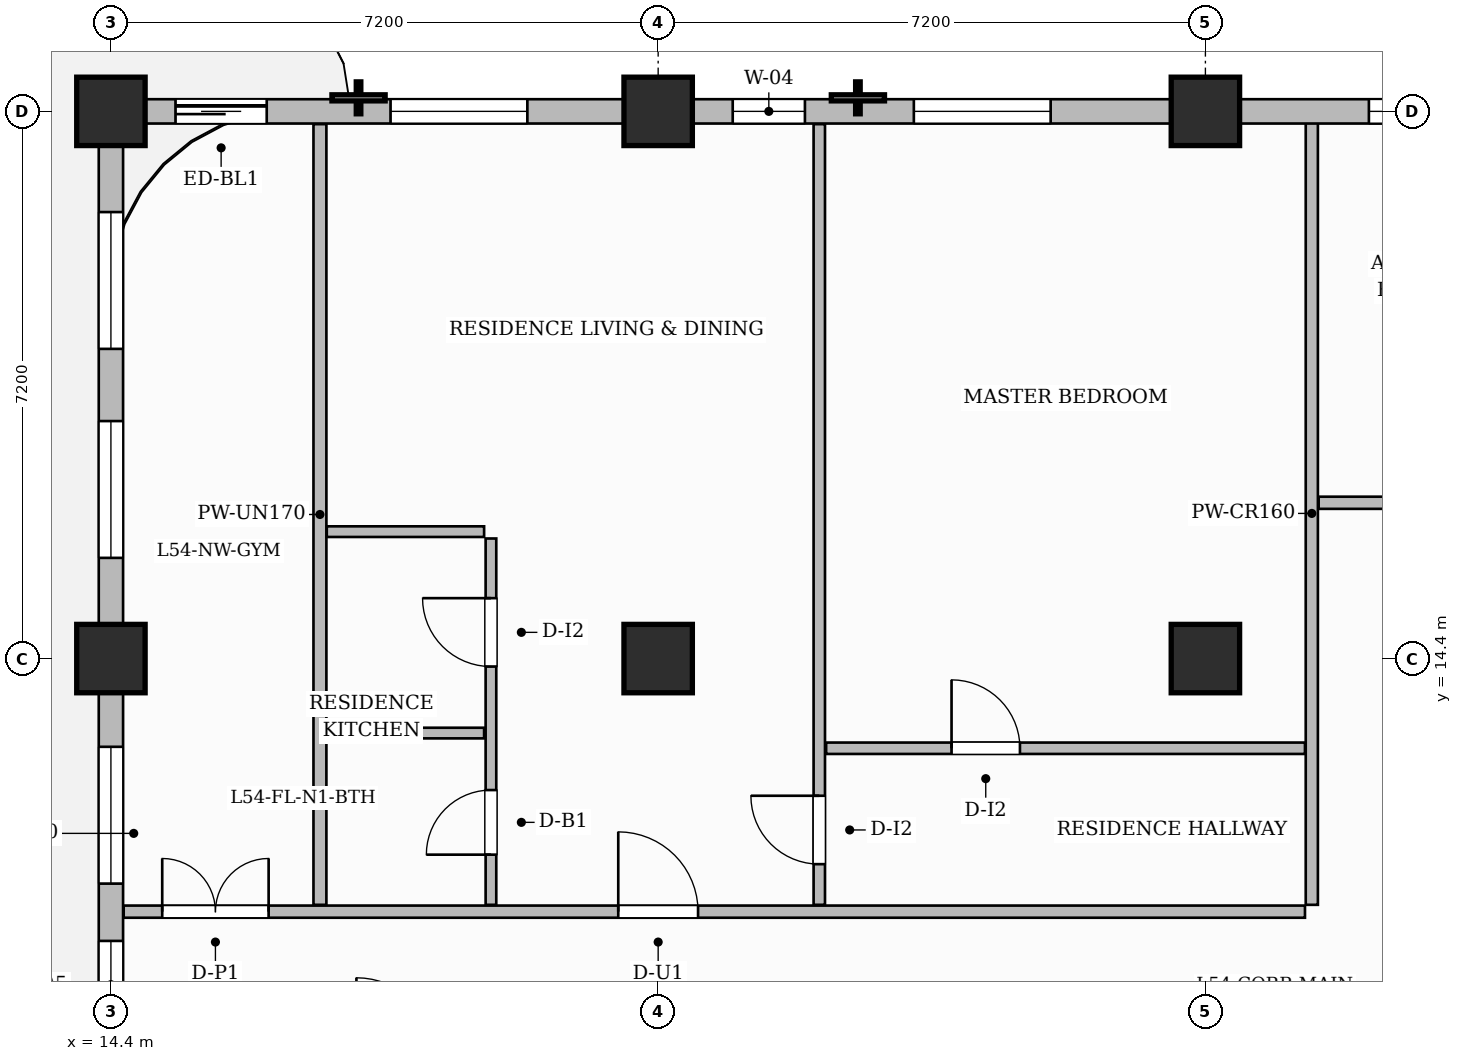
"""IFC4 building model, lengths in metres.
Left out: names, types, materials, properties, quantities, classifications, styles, units other than length and angle.
Written with IfcOpenShell. Run it as: python <this file> out.ifc"""

import sys

from ifc_helpers import new_model, si_unit, direction, frame, frame_2d, origin, origin_2d, place, context, subcontext, project, spatial, rectangle, extrude, source, transform, mapped, element, fill, save


model = new_model("IFC4")
c1 = context("Model", 3, precision=1e-05, world=origin(), true_north=direction((0.0, 1.0)))
c2 = subcontext(c1, "Body", "Model", "MODEL_VIEW")
j1 = project(units=[si_unit("LENGTHUNIT", "METRE"), si_unit("PLANEANGLEUNIT", "RADIAN")], contexts=[c1])
p1 = place(None, origin())
s1 = spatial("IfcSite", under=j1, at=p1, CompositionType="ELEMENT")
p2 = place(p1, origin())
s2 = spatial("IfcBuilding", under=s1, at=p2, CompositionType="ELEMENT")
p3 = place(p2, frame((0.0, 0.0, 217.3)))
s3 = spatial("IfcBuildingStorey", under=s2, at=p3, CompositionType="ELEMENT", Elevation=217.3)
m1 = source(origin(), c2, "Body", "SweptSolid", [
    extrude(rectangle(XDim=0.9, YDim=0.9, at=origin_2d()), origin(), (0.0, 0.0, 1.0), 3.85),
])
for number, where, z_axis, x_axis in (
    (1, (14.4, 14.4, 0.0), (0.0, 0.0, 1.0), (1.0, 0.0, 0.0)),
    (2, (14.4, 21.6, 0.0), (0.0, 0.0, 1.0), (1.0, 0.0, 0.0)),
    (3, (21.6, 14.4, 0.0), (0.0, 0.0, 1.0), (1.0, 0.0, 0.0)),
    (4, (21.6, 21.6, 0.0), (0.0, 0.0, 1.0), (1.0, 0.0, 0.0)),
    (5, (28.8, 14.4, 0.0), (0.0, 0.0, 1.0), (1.0, 0.0, 0.0)),
    (6, (28.8, 21.6, 0.0), (0.0, 0.0, 1.0), (1.0, 0.0, 0.0)),
):
    element("IfcColumn", number, at=place(p3, frame(where, z_axis=z_axis, x_axis=x_axis)), inside=s3, PredefinedType="COLUMN", context=c2, shape_type="MappedRepresentation", body=[
        mapped(m1, transform((0.0, 0.0, 0.0), scale=1.0)),
    ])
p4 = place(p3, frame((14.568, 11.07, 0.0), z_axis=(0.0, 0.0, 1.0), x_axis=(1.0, 0.0, 0.0)))
e7 = element("IfcWall", 7, at=p4, inside=s3, PredefinedType="PARTITIONING", context=c2, shape_type="SweptSolid", body=[
    extrude(rectangle(XDim=15.542, YDim=0.16, at=frame_2d((7.771, 0.0))), origin(), (0.0, 0.0, 1.0), 3.6),
])
p5 = place(p4, frame((0.507, 0.0, 0.0)))
e8 = element("IfcOpeningElement", 8, at=p5, cuts=e7, PredefinedType="OPENING", context=c2, shape_type="SweptSolid", body=[
    extrude(rectangle(XDim=1.4, YDim=2.35, at=frame_2d((0.7, 1.175))), frame((0.0, 0.09, 0.0), z_axis=(0.0, -1.0, 0.0), x_axis=(1.0, 0.0, 0.0)), (0.0, 0.0, 1.0), 0.18),
])
p6 = place(p4, frame((6.507, 0.0, 0.0)))
e9 = element("IfcOpeningElement", 9, at=p6, cuts=e7, PredefinedType="OPENING", context=c2, shape_type="SweptSolid", body=[
    extrude(rectangle(XDim=1.05, YDim=2.25, at=frame_2d((0.525, 1.125))), frame((0.0, 0.09, 0.0), z_axis=(0.0, -1.0, 0.0), x_axis=(1.0, 0.0, 0.0)), (0.0, 0.0, 1.0), 0.18),
])
p7 = place(p3, frame((30.2, 11.16, 0.0), z_axis=(0.0, 0.0, 1.0), x_axis=(0.0, 1.0, 0.0)))
e10 = element("IfcWall", 10, at=p7, inside=s3, PredefinedType="PARTITIONING", context=c2, shape_type="SweptSolid", body=[
    extrude(rectangle(XDim=10.3, YDim=0.16, at=frame_2d((5.15, 0.0))), origin(), (0.0, 0.0, 1.0), 3.6),
])
p8 = place(p3, frame((30.29, 16.45, 0.0), z_axis=(0.0, 0.0, 1.0), x_axis=(1.0, 0.0, 0.0)))
e11 = element("IfcWall", 11, at=p8, inside=s3, PredefinedType="PARTITIONING", context=c2, shape_type="SweptSolid", body=[
    extrude(rectangle(XDim=19.37, YDim=0.16, at=frame_2d((9.685, 0.0))), origin(), (0.0, 0.0, 1.0), 3.6),
])
p9 = place(p8, frame((1.135, 0.0, 0.0)))
e12 = element("IfcOpeningElement", 12, at=p9, cuts=e11, PredefinedType="OPENING", context=c2, shape_type="SweptSolid", body=[
    extrude(rectangle(XDim=0.85, YDim=2.1, at=frame_2d((0.425, 1.05))), frame((0.0, 0.09, 0.0), z_axis=(0.0, -1.0, 0.0), x_axis=(1.0, 0.0, 0.0)), (0.0, 0.0, 1.0), 0.18),
])
p10 = place(p8, frame((5.71, 0.0, 0.0)))
e13 = element("IfcOpeningElement", 13, at=p10, cuts=e11, PredefinedType="OPENING", context=c2, shape_type="SweptSolid", body=[
    extrude(rectangle(XDim=0.9, YDim=2.15, at=frame_2d((0.45, 1.075))), frame((0.0, 0.09, 0.0), z_axis=(0.0, -1.0, 0.0), x_axis=(1.0, 0.0, 0.0)), (0.0, 0.0, 1.0), 0.18),
])
p11 = place(p8, frame((10.635, 0.0, 0.0)))
e14 = element("IfcOpeningElement", 14, at=p11, cuts=e11, PredefinedType="OPENING", context=c2, shape_type="SweptSolid", body=[
    extrude(rectangle(XDim=0.95, YDim=2.15, at=frame_2d((0.475, 1.075))), frame((0.0, 0.09, 0.0), z_axis=(0.0, -1.0, 0.0), x_axis=(1.0, 0.0, 0.0)), (0.0, 0.0, 1.0), 0.18),
])
p12 = place(p8, frame((16.235, 0.0, 0.0)))
e15 = element("IfcOpeningElement", 15, at=p12, cuts=e11, PredefinedType="OPENING", context=c2, shape_type="SweptSolid", body=[
    extrude(rectangle(XDim=0.95, YDim=2.15, at=frame_2d((0.475, 1.075))), frame((0.0, 0.09, 0.0), z_axis=(0.0, -1.0, 0.0), x_axis=(1.0, 0.0, 0.0)), (0.0, 0.0, 1.0), 0.18),
])
p13 = place(p3, frame((17.15, 11.16, 0.0), z_axis=(0.0, 0.0, 1.0), x_axis=(0.0, 1.0, 0.0)))
e16 = element("IfcWall", 16, at=p13, inside=s3, PredefinedType="PARTITIONING", context=c2, shape_type="SweptSolid", body=[
    extrude(rectangle(XDim=10.272, YDim=0.17, at=frame_2d((5.136, 0.0))), origin(), (0.0, 0.0, 1.0), 3.6),
])
p14 = place(p3, frame((19.4, 11.16, 0.0), z_axis=(0.0, 0.0, 1.0), x_axis=(0.0, 1.0, 0.0)))
e17 = element("IfcWall", 17, at=p14, inside=s3, PredefinedType="PARTITIONING", context=c2, shape_type="SweptSolid", body=[
    extrude(rectangle(XDim=4.82, YDim=0.14, at=frame_2d((2.41, 0.0))), origin(), (0.0, 0.0, 1.0), 3.6),
])
p15 = place(p14, frame((0.66, 0.0, 0.0)))
e18 = element("IfcOpeningElement", 18, at=p15, cuts=e17, PredefinedType="OPENING", context=c2, shape_type="SweptSolid", body=[
    extrude(rectangle(XDim=0.85, YDim=2.1, at=frame_2d((0.425, 1.05))), frame((0.0, 0.08, 0.0), z_axis=(0.0, -1.0, 0.0), x_axis=(1.0, 0.0, 0.0)), (0.0, 0.0, 1.0), 0.16),
])
p16 = place(p14, frame((3.135, 0.0, 0.0)))
e19 = element("IfcOpeningElement", 19, at=p16, cuts=e17, PredefinedType="OPENING", context=c2, shape_type="SweptSolid", body=[
    extrude(rectangle(XDim=0.9, YDim=2.15, at=frame_2d((0.45, 1.075))), frame((0.0, 0.08, 0.0), z_axis=(0.0, -1.0, 0.0), x_axis=(1.0, 0.0, 0.0)), (0.0, 0.0, 1.0), 0.16),
])
for number, where, z_axis, x_axis in (
    (20, (17.24, 13.42, 0.0), (0.0, 0.0, 1.0), (1.0, 0.0, 0.0)),
    (21, (17.24, 16.07, 0.0), (0.0, 0.0, 1.0), (1.0, 0.0, 0.0)),
):
    element("IfcWall", number, at=place(p3, frame(where, z_axis=z_axis, x_axis=x_axis)), inside=s3, PredefinedType="PARTITIONING", context=c2, shape_type="SweptSolid", body=[
        extrude(rectangle(XDim=2.07, YDim=0.14, at=frame_2d((1.035, 0.0))), origin(), (0.0, 0.0, 1.0), 3.6),
    ])
p17 = place(p3, frame((23.72, 11.16, 0.0), z_axis=(0.0, 0.0, 1.0), x_axis=(0.0, 1.0, 0.0)))
e22 = element("IfcWall", 22, at=p17, inside=s3, PredefinedType="PARTITIONING", context=c2, shape_type="SweptSolid", body=[
    extrude(rectangle(XDim=10.272, YDim=0.15, at=frame_2d((5.136, 0.0))), origin(), (0.0, 0.0, 1.0), 3.6),
])
p18 = place(p17, frame((0.535, 0.0, 0.0)))
e23 = element("IfcOpeningElement", 23, at=p18, cuts=e22, PredefinedType="OPENING", context=c2, shape_type="SweptSolid", body=[
    extrude(rectangle(XDim=0.9, YDim=2.15, at=frame_2d((0.45, 1.075))), frame((0.0, 0.085, 0.0), z_axis=(0.0, -1.0, 0.0), x_axis=(1.0, 0.0, 0.0)), (0.0, 0.0, 1.0), 0.17),
])
p19 = place(p3, frame((23.81, 13.22, 0.0), z_axis=(0.0, 0.0, 1.0), x_axis=(1.0, 0.0, 0.0)))
e24 = element("IfcWall", 24, at=p19, inside=s3, PredefinedType="PARTITIONING", context=c2, shape_type="SweptSolid", body=[
    extrude(rectangle(XDim=6.3, YDim=0.15, at=frame_2d((3.15, 0.0))), origin(), (0.0, 0.0, 1.0), 3.6),
])
p20 = place(p19, frame((1.65, 0.0, 0.0)))
e25 = element("IfcOpeningElement", 25, at=p20, cuts=e24, PredefinedType="OPENING", context=c2, shape_type="SweptSolid", body=[
    extrude(rectangle(XDim=0.9, YDim=2.15, at=frame_2d((0.45, 1.075))), frame((0.0, 0.085, 0.0), z_axis=(0.0, -1.0, 0.0), x_axis=(1.0, 0.0, 0.0)), (0.0, 0.0, 1.0), 0.17),
])
p21 = place(p3, frame((14.4, 21.6, 0.0), z_axis=(0.0, 0.0, 1.0), x_axis=(1.0, 0.0, 0.0)))
e26 = element("IfcWall", 26, at=p21, inside=s3, PredefinedType="SOLIDWALL", context=c2, shape_type="SweptSolid", body=[
    extrude(rectangle(XDim=35.4, YDim=0.32, at=frame_2d((17.7, 0.0))), origin(), (0.0, 0.0, 1.0), 3.135),
])
p22 = place(p21, frame((0.85, 0.0, 0.0)))
e27 = element("IfcOpeningElement", 27, at=p22, cuts=e26, PredefinedType="OPENING", context=c2, shape_type="SweptSolid", body=[
    extrude(rectangle(XDim=1.2, YDim=2.2, at=frame_2d((0.6, 1.1))), frame((0.0, 0.17, 0.0), z_axis=(0.0, -1.0, 0.0), x_axis=(1.0, 0.0, 0.0)), (0.0, 0.0, 1.0), 0.34),
])
p23 = place(p21, frame((3.679, 0.0, 0.8)))
e28 = element("IfcOpeningElement", 28, at=p23, cuts=e26, PredefinedType="OPENING", context=c2, shape_type="SweptSolid", body=[
    extrude(rectangle(XDim=1.8, YDim=1.85, at=frame_2d((0.9, 0.925))), frame((0.0, 0.17, 0.0), z_axis=(0.0, -1.0, 0.0), x_axis=(1.0, 0.0, 0.0)), (0.0, 0.0, 1.0), 0.34),
])
p24 = place(p21, frame((8.181, 0.0, 0.8)))
e29 = element("IfcOpeningElement", 29, at=p24, cuts=e26, PredefinedType="OPENING", context=c2, shape_type="SweptSolid", body=[
    extrude(rectangle(XDim=0.95, YDim=1.75, at=frame_2d((0.475, 0.875))), frame((0.0, 0.17, 0.0), z_axis=(0.0, -1.0, 0.0), x_axis=(1.0, 0.0, 0.0)), (0.0, 0.0, 1.0), 0.34),
])
p25 = place(p21, frame((10.564, 0.0, 0.8)))
e30 = element("IfcOpeningElement", 30, at=p25, cuts=e26, PredefinedType="OPENING", context=c2, shape_type="SweptSolid", body=[
    extrude(rectangle(XDim=1.8, YDim=1.85, at=frame_2d((0.9, 0.925))), frame((0.0, 0.17, 0.0), z_axis=(0.0, -1.0, 0.0), x_axis=(1.0, 0.0, 0.0)), (0.0, 0.0, 1.0), 0.34),
])
p26 = place(p21, frame((16.551, 0.0, 0.8)))
e31 = element("IfcOpeningElement", 31, at=p26, cuts=e26, PredefinedType="OPENING", context=c2, shape_type="SweptSolid", body=[
    extrude(rectangle(XDim=1.8, YDim=1.85, at=frame_2d((0.9, 0.925))), frame((0.0, 0.17, 0.0), z_axis=(0.0, -1.0, 0.0), x_axis=(1.0, 0.0, 0.0)), (0.0, 0.0, 1.0), 0.34),
])
p27 = place(p21, frame((22.196, 0.0, 0.8)))
e32 = element("IfcOpeningElement", 32, at=p27, cuts=e26, PredefinedType="OPENING", context=c2, shape_type="SweptSolid", body=[
    extrude(rectangle(XDim=1.8, YDim=1.85, at=frame_2d((0.9, 0.925))), frame((0.0, 0.17, 0.0), z_axis=(0.0, -1.0, 0.0), x_axis=(1.0, 0.0, 0.0)), (0.0, 0.0, 1.0), 0.34),
])
p28 = place(p21, frame((25.329, 0.0, 0.8)))
e33 = element("IfcOpeningElement", 33, at=p28, cuts=e26, PredefinedType="OPENING", context=c2, shape_type="SweptSolid", body=[
    extrude(rectangle(XDim=1.15, YDim=1.8, at=frame_2d((0.575, 0.9))), frame((0.0, 0.17, 0.0), z_axis=(0.0, -1.0, 0.0), x_axis=(1.0, 0.0, 0.0)), (0.0, 0.0, 1.0), 0.34),
])
p29 = place(p21, frame((28.721, 0.0, 0.8)))
e34 = element("IfcOpeningElement", 34, at=p29, cuts=e26, PredefinedType="OPENING", context=c2, shape_type="SweptSolid", body=[
    extrude(rectangle(XDim=0.95, YDim=1.75, at=frame_2d((0.475, 0.875))), frame((0.0, 0.17, 0.0), z_axis=(0.0, -1.0, 0.0), x_axis=(1.0, 0.0, 0.0)), (0.0, 0.0, 1.0), 0.34),
])
p30 = place(p21, frame((31.404, 0.0, 0.8)))
e35 = element("IfcOpeningElement", 35, at=p30, cuts=e26, PredefinedType="OPENING", context=c2, shape_type="SweptSolid", body=[
    extrude(rectangle(XDim=1.8, YDim=1.85, at=frame_2d((0.9, 0.925))), frame((0.0, 0.17, 0.0), z_axis=(0.0, -1.0, 0.0), x_axis=(1.0, 0.0, 0.0)), (0.0, 0.0, 1.0), 0.34),
])
p31 = place(p3, frame((14.4, 0.05, 0.0), z_axis=(0.0, 0.0, 1.0), x_axis=(0.0, 1.0, 0.0)))
e36 = element("IfcWall", 36, at=p31, inside=s3, PredefinedType="SOLIDWALL", context=c2, shape_type="SweptSolid", body=[
    extrude(rectangle(XDim=21.5, YDim=0.32, at=frame_2d((10.75, 0.0))), origin(), (0.0, 0.0, 1.0), 3.135),
])
p32 = place(p31, frame((1.521, 0.0, 0.8)))
e37 = element("IfcOpeningElement", 37, at=p32, cuts=e36, PredefinedType="OPENING", context=c2, shape_type="SweptSolid", body=[
    extrude(rectangle(XDim=1.8, YDim=1.85, at=frame_2d((0.9, 0.925))), frame((0.0, 0.17, 0.0), z_axis=(0.0, -1.0, 0.0), x_axis=(1.0, 0.0, 0.0)), (0.0, 0.0, 1.0), 0.34),
])
p33 = place(p31, frame((4.529, 0.0, 0.8)))
e38 = element("IfcOpeningElement", 38, at=p33, cuts=e36, PredefinedType="OPENING", context=c2, shape_type="SweptSolid", body=[
    extrude(rectangle(XDim=1.4, YDim=1.85, at=frame_2d((0.7, 0.925))), frame((0.0, 0.17, 0.0), z_axis=(0.0, -1.0, 0.0), x_axis=(1.0, 0.0, 0.0)), (0.0, 0.0, 1.0), 0.34),
])
p34 = place(p31, frame((9.485, 0.0, 0.8)))
e39 = element("IfcOpeningElement", 39, at=p34, cuts=e36, PredefinedType="OPENING", context=c2, shape_type="SweptSolid", body=[
    extrude(rectangle(XDim=1.15, YDim=1.8, at=frame_2d((0.575, 0.9))), frame((0.0, 0.17, 0.0), z_axis=(0.0, -1.0, 0.0), x_axis=(1.0, 0.0, 0.0)), (0.0, 0.0, 1.0), 0.34),
])
p35 = place(p31, frame((11.389, 0.0, 0.8)))
e40 = element("IfcOpeningElement", 40, at=p35, cuts=e36, PredefinedType="OPENING", context=c2, shape_type="SweptSolid", body=[
    extrude(rectangle(XDim=1.8, YDim=1.85, at=frame_2d((0.9, 0.925))), frame((0.0, 0.17, 0.0), z_axis=(0.0, -1.0, 0.0), x_axis=(1.0, 0.0, 0.0)), (0.0, 0.0, 1.0), 0.34),
])
p36 = place(p31, frame((15.675, 0.0, 0.8)))
e41 = element("IfcOpeningElement", 41, at=p36, cuts=e36, PredefinedType="OPENING", context=c2, shape_type="SweptSolid", body=[
    extrude(rectangle(XDim=1.8, YDim=1.85, at=frame_2d((0.9, 0.925))), frame((0.0, 0.17, 0.0), z_axis=(0.0, -1.0, 0.0), x_axis=(1.0, 0.0, 0.0)), (0.0, 0.0, 1.0), 0.34),
])
p37 = place(p31, frame((18.425, 0.0, 0.8)))
e42 = element("IfcOpeningElement", 42, at=p37, cuts=e36, PredefinedType="OPENING", context=c2, shape_type="SweptSolid", body=[
    extrude(rectangle(XDim=1.8, YDim=1.85, at=frame_2d((0.9, 0.925))), frame((0.0, 0.17, 0.0), z_axis=(0.0, -1.0, 0.0), x_axis=(1.0, 0.0, 0.0)), (0.0, 0.0, 1.0), 0.34),
])
m2 = source(origin(), c2, "Body", "SweptSolid", [
    extrude(rectangle(XDim=1.4, YDim=2.35, at=frame_2d((0.7, 1.175))), frame((0.0, 0.025, 0.0), z_axis=(0.0, -1.0, 0.0), x_axis=(1.0, 0.0, 0.0)), (0.0, 0.0, 1.0), 0.05),
])
p38 = place(p5, origin())
e43 = element("IfcDoor", 43, at=p38, inside=s3, OperationType="DOUBLE_DOOR_SINGLE_SWING", PredefinedType="DOOR", context=c2, shape_type="MappedRepresentation", body=[
    mapped(m2, transform((0.0, 0.0, 0.0), scale=1.0)),
])
fill(e8, e43)
m3 = source(origin(), c2, "Body", "SweptSolid", [
    extrude(rectangle(XDim=0.85, YDim=2.1, at=frame_2d((0.425, 1.05))), frame((0.0, 0.025, 0.0), z_axis=(0.0, -1.0, 0.0), x_axis=(1.0, 0.0, 0.0)), (0.0, 0.0, 1.0), 0.05),
])
p39 = place(p15, origin())
e44 = element("IfcDoor", 44, at=p39, inside=s3, OperationType="SINGLE_SWING_LEFT", PredefinedType="DOOR", context=c2, shape_type="MappedRepresentation", body=[
    mapped(m3, transform((0.0, 0.0, 0.0), scale=1.0)),
])
fill(e18, e44)
m4 = source(origin(), c2, "Body", "SweptSolid", [
    extrude(rectangle(XDim=0.9, YDim=2.15, at=frame_2d((0.45, 1.075))), frame((0.0, 0.025, 0.0), z_axis=(0.0, -1.0, 0.0), x_axis=(1.0, 0.0, 0.0)), (0.0, 0.0, 1.0), 0.05),
])
p40 = place(p16, origin())
e45 = element("IfcDoor", 45, at=p40, inside=s3, OperationType="SINGLE_SWING_RIGHT", PredefinedType="DOOR", context=c2, shape_type="MappedRepresentation", body=[
    mapped(m4, transform((0.0, 0.0, 0.0), scale=1.0)),
])
fill(e19, e45)
m5 = source(origin(), c2, "Body", "SweptSolid", [
    extrude(rectangle(XDim=1.05, YDim=2.25, at=frame_2d((0.525, 1.125))), frame((0.0, 0.025, 0.0), z_axis=(0.0, -1.0, 0.0), x_axis=(1.0, 0.0, 0.0)), (0.0, 0.0, 1.0), 0.05),
])
p41 = place(p6, origin())
e46 = element("IfcDoor", 46, at=p41, inside=s3, OperationType="SINGLE_SWING_LEFT", PredefinedType="DOOR", context=c2, shape_type="MappedRepresentation", body=[
    mapped(m5, transform((0.0, 0.0, 0.0), scale=1.0)),
])
fill(e9, e46)
p42 = place(p18, origin())
e47 = element("IfcDoor", 47, at=p42, inside=s3, OperationType="SINGLE_SWING_RIGHT", PredefinedType="DOOR", context=c2, shape_type="MappedRepresentation", body=[
    mapped(m4, transform((0.0, 0.0, 0.0), scale=1.0)),
])
fill(e23, e47)
p43 = place(p20, origin())
e48 = element("IfcDoor", 48, at=p43, inside=s3, OperationType="SINGLE_SWING_LEFT", PredefinedType="DOOR", context=c2, shape_type="MappedRepresentation", body=[
    mapped(m4, transform((0.0, 0.0, 0.0), scale=1.0)),
])
fill(e25, e48)
m6 = source(origin(), c2, "Body", "SweptSolid", [
    extrude(rectangle(XDim=1.2, YDim=2.2, at=frame_2d((0.6, 1.1))), frame((0.0, 0.025, 0.0), z_axis=(0.0, -1.0, 0.0), x_axis=(1.0, 0.0, 0.0)), (0.0, 0.0, 1.0), 0.05),
])
p44 = place(p22, origin())
e49 = element("IfcDoor", 49, at=p44, inside=s3, OperationType="SLIDING_TO_LEFT", PredefinedType="DOOR", context=c2, shape_type="MappedRepresentation", body=[
    mapped(m6, transform((0.0, 0.0, 0.0), scale=1.0)),
])
fill(e27, e49)
m7 = source(origin(), c2, "Body", "SweptSolid", [
    extrude(rectangle(XDim=1.8, YDim=1.85, at=frame_2d((0.9, 0.925))), frame((0.0, 0.03, 0.0), z_axis=(0.0, -1.0, 0.0), x_axis=(1.0, 0.0, 0.0)), (0.0, 0.0, 1.0), 0.06),
])
p45 = place(p23, origin())
e50 = element("IfcWindow", 50, at=p45, inside=s3, PartitioningType="DOUBLE_PANEL_VERTICAL", PredefinedType="WINDOW", context=c2, shape_type="MappedRepresentation", body=[
    mapped(m7, transform((0.0, 0.0, 0.0), scale=1.0)),
])
fill(e28, e50)
m8 = source(origin(), c2, "Body", "SweptSolid", [
    extrude(rectangle(XDim=0.95, YDim=1.75, at=frame_2d((0.475, 0.875))), frame((0.0, 0.03, 0.0), z_axis=(0.0, -1.0, 0.0), x_axis=(1.0, 0.0, 0.0)), (0.0, 0.0, 1.0), 0.06),
])
p46 = place(p24, origin())
e51 = element("IfcWindow", 51, at=p46, inside=s3, PartitioningType="SINGLE_PANEL", PredefinedType="WINDOW", context=c2, shape_type="MappedRepresentation", body=[
    mapped(m8, transform((0.0, 0.0, 0.0), scale=1.0)),
])
fill(e29, e51)
p47 = place(p25, origin())
e52 = element("IfcWindow", 52, at=p47, inside=s3, PartitioningType="DOUBLE_PANEL_VERTICAL", PredefinedType="WINDOW", context=c2, shape_type="MappedRepresentation", body=[
    mapped(m7, transform((0.0, 0.0, 0.0), scale=1.0)),
])
fill(e30, e52)
p48 = place(p26, origin())
e53 = element("IfcWindow", 53, at=p48, inside=s3, PartitioningType="DOUBLE_PANEL_VERTICAL", PredefinedType="WINDOW", context=c2, shape_type="MappedRepresentation", body=[
    mapped(m7, transform((0.0, 0.0, 0.0), scale=1.0)),
])
fill(e31, e53)
m9 = source(origin(), c2, "Body", "SweptSolid", [
    extrude(rectangle(XDim=1.15, YDim=1.8, at=frame_2d((0.575, 0.9))), frame((0.0, 0.03, 0.0), z_axis=(0.0, -1.0, 0.0), x_axis=(1.0, 0.0, 0.0)), (0.0, 0.0, 1.0), 0.06),
])
p49 = place(p34, origin())
e54 = element("IfcWindow", 54, at=p49, inside=s3, PartitioningType="SINGLE_PANEL", PredefinedType="WINDOW", context=c2, shape_type="MappedRepresentation", body=[
    mapped(m9, transform((0.0, 0.0, 0.0), scale=1.0)),
])
fill(e39, e54)
p50 = place(p35, origin())
e55 = element("IfcWindow", 55, at=p50, inside=s3, PartitioningType="DOUBLE_PANEL_VERTICAL", PredefinedType="WINDOW", context=c2, shape_type="MappedRepresentation", body=[
    mapped(m7, transform((0.0, 0.0, 0.0), scale=1.0)),
])
fill(e40, e55)
p51 = place(p36, origin())
e56 = element("IfcWindow", 56, at=p51, inside=s3, PartitioningType="DOUBLE_PANEL_VERTICAL", PredefinedType="WINDOW", context=c2, shape_type="MappedRepresentation", body=[
    mapped(m7, transform((0.0, 0.0, 0.0), scale=1.0)),
])
fill(e41, e56)
p52 = place(p37, origin())
e57 = element("IfcWindow", 57, at=p52, inside=s3, PartitioningType="DOUBLE_PANEL_VERTICAL", PredefinedType="WINDOW", context=c2, shape_type="MappedRepresentation", body=[
    mapped(m7, transform((0.0, 0.0, 0.0), scale=1.0)),
])
fill(e42, e57)
save(model, sys.argv[1])
